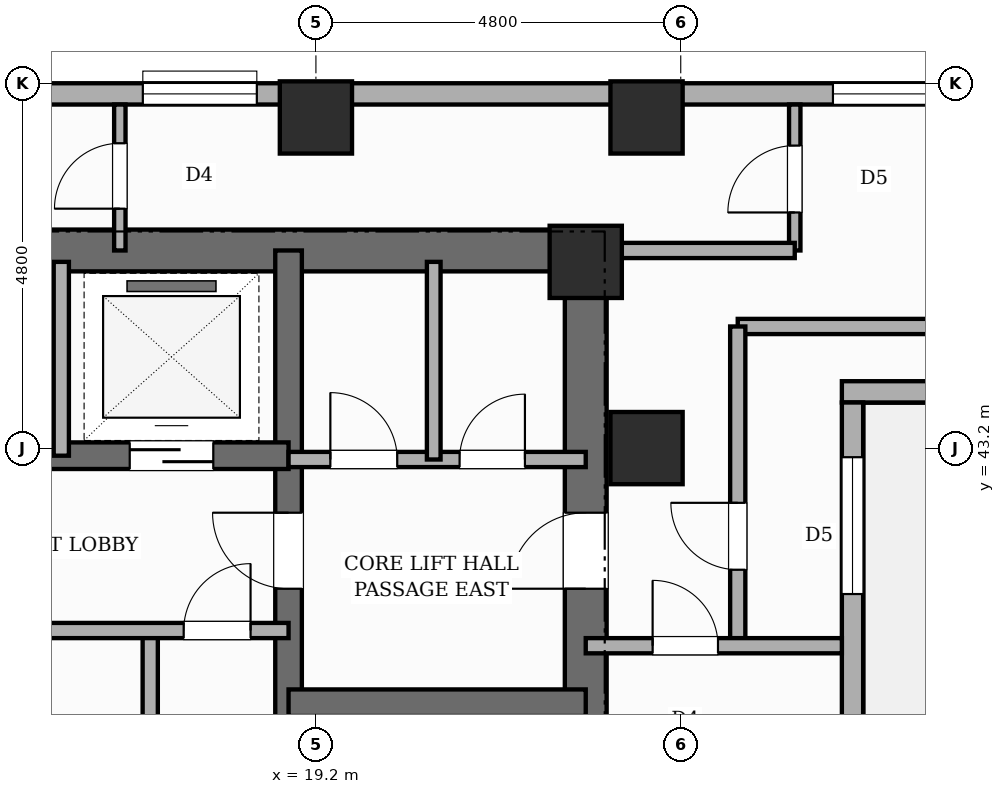
"""IFC4 building model, lengths in metres.
Left out: names, types, materials, properties, quantities, classifications, styles, units other than length and angle.
Written with IfcOpenShell. Run it as: python <this file> out.ifc"""

import sys

from ifc_helpers import new_model, si_unit, direction, frame, frame_2d, origin, origin_2d, place, context, subcontext, project, spatial, rectangle, extrude, element, fill, save


model = new_model("IFC4")
c1 = context("Model", 3, precision=1e-05, world=origin(), true_north=direction((0.0, 1.0)))
c2 = subcontext(c1, "Body", "Model", "MODEL_VIEW")
j1 = project(units=[si_unit("LENGTHUNIT", "METRE"), si_unit("PLANEANGLEUNIT", "RADIAN")], contexts=[c1])
p1 = place(None, origin())
s1 = spatial("IfcSite", under=j1, at=p1, CompositionType="ELEMENT")
p2 = place(p1, origin())
s2 = spatial("IfcBuilding", under=s1, at=p2, CompositionType="ELEMENT")
p3 = place(p2, frame((0.0, 0.0, 193.6)))
s3 = spatial("IfcBuildingStorey", under=s2, at=p3, CompositionType="ELEMENT", Elevation=193.6)
p4 = place(p3, frame((22.75, 30.625, 0.0), z_axis=(0.0, 0.0, 1.0), x_axis=(0.0, 1.0, 0.0)))
e1 = element("IfcWall", 1, at=p4, inside=s3, PredefinedType="SHEAR", context=c2, shape_type="SweptSolid", body=[
    extrude(rectangle(XDim=15.45, YDim=0.55, at=frame_2d((7.725, 0.0))), origin(), (0.0, 0.0, 1.0), 4.8),
])
p5 = place(p4, frame((10.725, 0.0, 0.0)))
e2 = element("IfcOpeningElement", 2, at=p5, cuts=e1, PredefinedType="OPENING", context=c2, shape_type="SweptSolid", body=[
    extrude(rectangle(XDim=1.0, YDim=2.15, at=frame_2d((0.5, 1.075))), frame((0.0, 0.285, 0.0), z_axis=(0.0, -1.0, 0.0), x_axis=(1.0, 0.0, 0.0)), (0.0, 0.0, 1.0), 0.57),
])
p6 = place(p3, frame((6.05, 45.8, 0.0), z_axis=(0.0, 0.0, 1.0), x_axis=(1.0, 0.0, 0.0)))
e3 = element("IfcWall", 3, at=p6, inside=s3, PredefinedType="SHEAR", context=c2, shape_type="SweptSolid", body=[
    extrude(rectangle(XDim=16.7, YDim=0.55, at=frame_2d((8.35, 0.0))), origin(), (0.0, 0.0, 1.0), 4.8),
])
p7 = place(p3, frame((18.84, 30.9, 0.0), z_axis=(0.0, 0.0, 1.0), x_axis=(0.0, 1.0, 0.0)))
e4 = element("IfcWall", 4, at=p7, inside=s3, PredefinedType="SHEAR", context=c2, shape_type="SweptSolid", body=[
    extrude(rectangle(XDim=14.9, YDim=0.35, at=frame_2d((7.45, 0.0))), origin(), (0.0, 0.0, 1.0), 4.8),
])
p8 = place(p7, frame((0.65, 0.0, 0.0)))
e5 = element("IfcOpeningElement", 5, at=p8, cuts=e4, PredefinedType="OPENING", context=c2, shape_type="SweptSolid", body=[
    extrude(rectangle(XDim=0.95, YDim=2.1, at=frame_2d((0.475, 1.05))), frame((0.0, 0.185, 0.0), z_axis=(0.0, -1.0, 0.0), x_axis=(1.0, 0.0, 0.0)), (0.0, 0.0, 1.0), 0.37),
])
p9 = place(p7, frame((10.45, 0.0, 0.0)))
e6 = element("IfcOpeningElement", 6, at=p9, cuts=e4, PredefinedType="OPENING", context=c2, shape_type="SweptSolid", body=[
    extrude(rectangle(XDim=1.0, YDim=2.15, at=frame_2d((0.5, 1.075))), frame((0.0, 0.185, 0.0), z_axis=(0.0, -1.0, 0.0), x_axis=(1.0, 0.0, 0.0)), (0.0, 0.0, 1.0), 0.37),
])
p10 = place(p3, frame((18.84, 39.85, 0.0), z_axis=(0.0, 0.0, 1.0), x_axis=(1.0, 0.0, 0.0)))
e7 = element("IfcWall", 7, at=p10, inside=s3, PredefinedType="SHEAR", context=c2, shape_type="SweptSolid", body=[
    extrude(rectangle(XDim=3.91, YDim=0.35, at=frame_2d((1.955, 0.0))), origin(), (0.0, 0.0, 1.0), 4.8),
])
p11 = place(p3, frame((9.96, 43.1, 0.0), z_axis=(0.0, 0.0, 1.0), x_axis=(1.0, 0.0, 0.0)))
e8 = element("IfcWall", 8, at=p11, inside=s3, PredefinedType="SHEAR", context=c2, shape_type="SweptSolid", body=[
    extrude(rectangle(XDim=8.88, YDim=0.35, at=frame_2d((4.44, 0.0))), origin(), (0.0, 0.0, 1.0), 4.8),
])
p12 = place(p11, frame((0.99, 0.0, 0.0)))
e9 = element("IfcOpeningElement", 9, at=p12, cuts=e8, PredefinedType="OPENING", context=c2, shape_type="SweptSolid", body=[
    extrude(rectangle(XDim=1.1, YDim=2.15, at=frame_2d((0.55, 1.075))), frame((0.0, 0.185, 0.0), z_axis=(0.0, -1.0, 0.0), x_axis=(1.0, 0.0, 0.0)), (0.0, 0.0, 1.0), 0.37),
])
p13 = place(p11, frame((3.89, 0.0, 0.0)))
e10 = element("IfcOpeningElement", 10, at=p13, cuts=e8, PredefinedType="OPENING", context=c2, shape_type="SweptSolid", body=[
    extrude(rectangle(XDim=1.1, YDim=2.15, at=frame_2d((0.55, 1.075))), frame((0.0, 0.185, 0.0), z_axis=(0.0, -1.0, 0.0), x_axis=(1.0, 0.0, 0.0)), (0.0, 0.0, 1.0), 0.37),
])
p14 = place(p11, frame((6.79, 0.0, 0.0)))
e11 = element("IfcOpeningElement", 11, at=p14, cuts=e8, PredefinedType="OPENING", context=c2, shape_type="SweptSolid", body=[
    extrude(rectangle(XDim=1.1, YDim=2.15, at=frame_2d((0.55, 1.075))), frame((0.0, 0.185, 0.0), z_axis=(0.0, -1.0, 0.0), x_axis=(1.0, 0.0, 0.0)), (0.0, 0.0, 1.0), 0.37),
])
for number, where, z_axis, x_axis in (
    (12, (19.2, 47.55, 0.0), (0.0, 0.0, 1.0), (1.0, 0.0, 0.0)),
    (13, (22.75, 45.65, 0.0), (0.0, 0.0, 1.0), (1.0, 0.0, 0.0)),
    (14, (23.55, 43.2, 0.0), (0.0, 0.0, 1.0), (1.0, 0.0, 0.0)),
    (15, (23.55, 47.55, 0.0), (0.0, 0.0, 1.0), (1.0, 0.0, 0.0)),
):
    element("IfcColumn", number, at=place(p3, frame(where, z_axis=z_axis, x_axis=x_axis)), inside=s3, PredefinedType="COLUMN", context=c2, shape_type="SweptSolid", body=[
        extrude(rectangle(XDim=0.95, YDim=0.95, at=origin_2d()), origin(), (0.0, 0.0, 1.0), 4.8),
    ])
p15 = place(p3, frame((7.2, 47.86, 0.0), z_axis=(0.0, 0.0, 1.0), x_axis=(1.0, 0.0, 0.0)))
e16 = element("IfcWall", 16, at=p15, inside=s3, PredefinedType="STANDARD", context=c2, shape_type="SweptSolid", body=[
    extrude(rectangle(XDim=43.2, YDim=0.28, at=frame_2d((21.6, 0.0))), origin(), (0.0, 0.0, 1.0), 3.78),
])
p16 = place(p15, frame((18.802, 0.0, 0.8)))
e17 = element("IfcOpeningElement", 17, at=p16, cuts=e16, PredefinedType="OPENING", context=c2, shape_type="SweptSolid", body=[
    extrude(rectangle(XDim=1.8, YDim=2.1, at=frame_2d((0.9, 1.05))), frame((0.0, 0.15, 0.0), z_axis=(0.0, -1.0, 0.0), x_axis=(1.0, 0.0, 0.0)), (0.0, 0.0, 1.0), 0.3),
])
p17 = place(p15, frame((0.383, 0.0, 0.8)))
e18 = element("IfcOpeningElement", 18, at=p17, cuts=e16, PredefinedType="OPENING", context=c2, shape_type="SweptSolid", body=[
    extrude(rectangle(XDim=1.2, YDim=1.8, at=frame_2d((0.6, 0.9))), frame((0.0, 0.15, 0.0), z_axis=(0.0, -1.0, 0.0), x_axis=(1.0, 0.0, 0.0)), (0.0, 0.0, 1.0), 0.3),
])
p18 = place(p15, frame((9.722, 0.0, 0.8)))
e19 = element("IfcOpeningElement", 19, at=p18, cuts=e16, PredefinedType="OPENING", context=c2, shape_type="SweptSolid", body=[
    extrude(rectangle(XDim=1.5, YDim=2.1, at=frame_2d((0.75, 1.05))), frame((0.0, 0.15, 0.0), z_axis=(0.0, -1.0, 0.0), x_axis=(1.0, 0.0, 0.0)), (0.0, 0.0, 1.0), 0.3),
])
p19 = place(p3, frame((30.04, 43.94, 0.0), z_axis=(0.0, 0.0, 1.0), x_axis=(-1.0, 0.0, 0.0)))
e20 = element("IfcWall", 20, at=p19, inside=s3, PredefinedType="STANDARD", context=c2, shape_type="SweptSolid", body=[
    extrude(rectangle(XDim=3.92, YDim=0.28, at=frame_2d((1.96, 0.0))), origin(), (0.0, 0.0, 1.0), 4.5),
])
p20 = place(p3, frame((26.26, 43.8, 0.0), z_axis=(0.0, 0.0, 1.0), x_axis=(0.0, -1.0, 0.0)))
e21 = element("IfcWall", 21, at=p20, inside=s3, PredefinedType="STANDARD", context=c2, shape_type="SweptSolid", body=[
    extrude(rectangle(XDim=15.0, YDim=0.28, at=frame_2d((7.5, 0.0))), origin(), (0.0, 0.0, 1.0), 4.5),
])
p21 = place(p20, frame((8.15, 0.0, 0.0)))
e22 = element("IfcOpeningElement", 22, at=p21, cuts=e21, PredefinedType="OPENING", context=c2, shape_type="SweptSolid", body=[
    extrude(rectangle(XDim=1.3, YDim=2.2, at=frame_2d((0.65, 1.1))), frame((0.0, 0.15, 0.0), z_axis=(0.0, -1.0, 0.0), x_axis=(1.0, 0.0, 0.0)), (0.0, 0.0, 1.0), 0.3),
])
p22 = place(p20, frame((0.72, 0.0, 0.8)))
e23 = element("IfcOpeningElement", 23, at=p22, cuts=e21, PredefinedType="OPENING", context=c2, shape_type="SweptSolid", body=[
    extrude(rectangle(XDim=1.8, YDim=2.1, at=frame_2d((0.9, 1.05))), frame((0.0, 0.15, 0.0), z_axis=(0.0, -1.0, 0.0), x_axis=(1.0, 0.0, 0.0)), (0.0, 0.0, 1.0), 0.3),
])
p23 = place(p20, frame((4.735, 0.0, 0.8)))
e24 = element("IfcOpeningElement", 24, at=p23, cuts=e21, PredefinedType="OPENING", context=c2, shape_type="SweptSolid", body=[
    extrude(rectangle(XDim=1.8, YDim=2.1, at=frame_2d((0.9, 1.05))), frame((0.0, 0.15, 0.0), z_axis=(0.0, -1.0, 0.0), x_axis=(1.0, 0.0, 0.0)), (0.0, 0.0, 1.0), 0.3),
])
p24 = place(p3, frame((17.02, 35.65, 0.0), z_axis=(0.0, 0.0, 1.0), x_axis=(0.0, 1.0, 0.0)))
e25 = element("IfcWall", 25, at=p24, inside=s3, PredefinedType="POLYGONAL", context=c2, shape_type="SweptSolid", body=[
    extrude(rectangle(XDim=5.15, YDim=0.2, at=frame_2d((2.575, 0.0))), origin(), (0.0, 0.0, 1.0), 4.5),
])
p25 = place(p3, frame((9.96, 40.8, 0.0), z_axis=(0.0, 0.0, 1.0), x_axis=(1.0, 0.0, 0.0)))
e26 = element("IfcWall", 26, at=p25, inside=s3, PredefinedType="POLYGONAL", context=c2, shape_type="SweptSolid", body=[
    extrude(rectangle(XDim=8.88, YDim=0.2, at=frame_2d((4.44, 0.0))), origin(), (0.0, 0.0, 1.0), 4.5),
])
p26 = place(p25, frame((7.5, 0.0, 0.0)))
e27 = element("IfcOpeningElement", 27, at=p26, cuts=e26, PredefinedType="OPENING", context=c2, shape_type="SweptSolid", body=[
    extrude(rectangle(XDim=0.88, YDim=2.1, at=frame_2d((0.44, 1.05))), frame((0.0, 0.11, 0.0), z_axis=(0.0, -1.0, 0.0), x_axis=(1.0, 0.0, 0.0)), (0.0, 0.0, 1.0), 0.22),
])
p27 = place(p25, frame((3.6, 0.0, 0.0)))
e28 = element("IfcOpeningElement", 28, at=p27, cuts=e26, PredefinedType="OPENING", context=c2, shape_type="SweptSolid", body=[
    extrude(rectangle(XDim=0.88, YDim=2.1, at=frame_2d((0.44, 1.05))), frame((0.0, 0.11, 0.0), z_axis=(0.0, -1.0, 0.0), x_axis=(1.0, 0.0, 0.0)), (0.0, 0.0, 1.0), 0.22),
])
p28 = place(p3, frame((18.84, 43.05, 0.0), z_axis=(0.0, 0.0, 1.0), x_axis=(1.0, 0.0, 0.0)))
e29 = element("IfcWall", 29, at=p28, inside=s3, PredefinedType="POLYGONAL", context=c2, shape_type="SweptSolid", body=[
    extrude(rectangle(XDim=3.91, YDim=0.2, at=frame_2d((1.955, 0.0))), origin(), (0.0, 0.0, 1.0), 3.78),
])
p29 = place(p28, frame((0.55, 0.0, 0.0)))
e30 = element("IfcOpeningElement", 30, at=p29, cuts=e29, PredefinedType="OPENING", context=c2, shape_type="SweptSolid", body=[
    extrude(rectangle(XDim=0.88, YDim=2.1, at=frame_2d((0.44, 1.05))), frame((0.0, 0.11, 0.0), z_axis=(0.0, -1.0, 0.0), x_axis=(1.0, 0.0, 0.0)), (0.0, 0.0, 1.0), 0.22),
])
p30 = place(p28, frame((2.25, 0.0, 0.0)))
e31 = element("IfcOpeningElement", 31, at=p30, cuts=e29, PredefinedType="OPENING", context=c2, shape_type="SweptSolid", body=[
    extrude(rectangle(XDim=0.86, YDim=2.1, at=frame_2d((0.43, 1.05))), frame((0.0, 0.11, 0.0), z_axis=(0.0, -1.0, 0.0), x_axis=(1.0, 0.0, 0.0)), (0.0, 0.0, 1.0), 0.22),
])
p31 = place(p3, frame((15.85, 43.1, 0.0), z_axis=(0.0, 0.0, 1.0), x_axis=(0.0, 1.0, 0.0)))
e32 = element("IfcWall", 32, at=p31, inside=s3, PredefinedType="POLYGONAL", context=c2, shape_type="SweptSolid", body=[
    extrude(rectangle(XDim=2.55, YDim=0.2, at=frame_2d((1.275, 0.0))), origin(), (0.0, 0.0, 1.0), 4.5),
])
p32 = place(p3, frame((20.75, 43.05, 0.0), z_axis=(0.0, 0.0, 1.0), x_axis=(0.0, 1.0, 0.0)))
e33 = element("IfcWall", 33, at=p32, inside=s3, PredefinedType="PLUMBINGWALL", context=c2, shape_type="SweptSolid", body=[
    extrude(rectangle(XDim=2.6, YDim=0.18, at=frame_2d((1.3, 0.0))), origin(), (0.0, 0.0, 1.0), 4.5),
])
p33 = place(p3, frame((25.5, 45.8, 0.0), z_axis=(0.0, 0.0, 1.0), x_axis=(0.0, 1.0, 0.0)))
e34 = element("IfcWall", 34, at=p33, inside=s3, PredefinedType="PARTITIONING", context=c2, shape_type="SweptSolid", body=[
    extrude(rectangle(XDim=1.92, YDim=0.15, at=frame_2d((0.96, 0.0))), origin(), (0.0, 0.0, 1.0), 4.5),
])
p34 = place(p33, frame((0.5, 0.0, 0.0)))
e35 = element("IfcOpeningElement", 35, at=p34, cuts=e34, PredefinedType="OPENING", context=c2, shape_type="SweptSolid", body=[
    extrude(rectangle(XDim=0.88, YDim=2.1, at=frame_2d((0.44, 1.05))), frame((0.0, 0.085, 0.0), z_axis=(0.0, -1.0, 0.0), x_axis=(1.0, 0.0, 0.0)), (0.0, 0.0, 1.0), 0.17),
])
p35 = place(p3, frame((16.62, 45.8, 0.0), z_axis=(0.0, 0.0, 1.0), x_axis=(0.0, 1.0, 0.0)))
e36 = element("IfcWall", 36, at=p35, inside=s3, PredefinedType="PARTITIONING", context=c2, shape_type="SweptSolid", body=[
    extrude(rectangle(XDim=1.92, YDim=0.15, at=frame_2d((0.96, 0.0))), origin(), (0.0, 0.0, 1.0), 4.5),
])
p36 = place(p35, frame((0.55, 0.0, 0.0)))
e37 = element("IfcOpeningElement", 37, at=p36, cuts=e36, PredefinedType="OPENING", context=c2, shape_type="SweptSolid", body=[
    extrude(rectangle(XDim=0.86, YDim=2.1, at=frame_2d((0.43, 1.05))), frame((0.0, 0.085, 0.0), z_axis=(0.0, -1.0, 0.0), x_axis=(1.0, 0.0, 0.0)), (0.0, 0.0, 1.0), 0.17),
])
p37 = place(p3, frame((22.75, 45.8, 0.0), z_axis=(0.0, 0.0, 1.0), x_axis=(1.0, 0.0, 0.0)))
e38 = element("IfcWall", 38, at=p37, inside=s3, PredefinedType="PARTITIONING", context=c2, shape_type="SweptSolid", body=[
    extrude(rectangle(XDim=2.75, YDim=0.2, at=frame_2d((1.375, 0.0))), origin(), (0.0, 0.0, 1.0), 4.5),
])
p38 = place(p3, frame((24.75, 44.8, 0.0), z_axis=(0.0, 0.0, 1.0), x_axis=(1.0, 0.0, 0.0)))
e39 = element("IfcWall", 39, at=p38, inside=s3, PredefinedType="PARTITIONING", context=c2, shape_type="SweptSolid", body=[
    extrude(rectangle(XDim=17.03, YDim=0.2, at=frame_2d((8.515, 0.0))), origin(), (0.0, 0.0, 1.0), 4.5),
])
p39 = place(p3, frame((24.75, 40.6, 0.0), z_axis=(0.0, 0.0, 1.0), x_axis=(0.0, 1.0, 0.0)))
e40 = element("IfcWall", 40, at=p39, inside=s3, PredefinedType="PARTITIONING", context=c2, shape_type="SweptSolid", body=[
    extrude(rectangle(XDim=4.2, YDim=0.2, at=frame_2d((2.1, 0.0))), origin(), (0.0, 0.0, 1.0), 4.5),
])
p40 = place(p39, frame((1.0, 0.0, 0.0)))
e41 = element("IfcOpeningElement", 41, at=p40, cuts=e40, PredefinedType="OPENING", context=c2, shape_type="SweptSolid", body=[
    extrude(rectangle(XDim=0.88, YDim=2.1, at=frame_2d((0.44, 1.05))), frame((0.0, 0.11, 0.0), z_axis=(0.0, -1.0, 0.0), x_axis=(1.0, 0.0, 0.0)), (0.0, 0.0, 1.0), 0.22),
])
p41 = place(p3, frame((22.75, 40.6, 0.0), z_axis=(0.0, 0.0, 1.0), x_axis=(1.0, 0.0, 0.0)))
e42 = element("IfcWall", 42, at=p41, inside=s3, PredefinedType="PARTITIONING", context=c2, shape_type="SweptSolid", body=[
    extrude(rectangle(XDim=3.37, YDim=0.2, at=frame_2d((1.685, 0.0))), origin(), (0.0, 0.0, 1.0), 4.5),
])
p42 = place(p41, frame((0.88, 0.0, 0.0)))
e43 = element("IfcOpeningElement", 43, at=p42, cuts=e42, PredefinedType="OPENING", context=c2, shape_type="SweptSolid", body=[
    extrude(rectangle(XDim=0.86, YDim=2.1, at=frame_2d((0.43, 1.05))), frame((0.0, 0.11, 0.0), z_axis=(0.0, -1.0, 0.0), x_axis=(1.0, 0.0, 0.0)), (0.0, 0.0, 1.0), 0.22),
])
p43 = place(p16, origin())
e44 = element("IfcWindow", 44, at=p43, inside=s3, PartitioningType="SINGLE_PANEL", PredefinedType="WINDOW", context=c2, shape_type="SweptSolid", body=[
    extrude(rectangle(XDim=1.8, YDim=2.1, at=frame_2d((0.9, 1.05))), frame((0.0, 0.03, 0.0), z_axis=(0.0, -1.0, 0.0), x_axis=(1.0, 0.0, 0.0)), (0.0, 0.0, 1.0), 0.06),
])
fill(e17, e44)
p44 = place(p18, origin())
e45 = element("IfcWindow", 45, at=p44, inside=s3, PartitioningType="SINGLE_PANEL", PredefinedType="WINDOW", context=c2, shape_type="SweptSolid", body=[
    extrude(rectangle(XDim=1.5, YDim=2.1, at=frame_2d((0.75, 1.05))), frame((0.0, 0.03, 0.0), z_axis=(0.0, -1.0, 0.0), x_axis=(1.0, 0.0, 0.0)), (0.0, 0.0, 1.0), 0.06),
])
fill(e19, e45)
p45 = place(p22, origin())
e46 = element("IfcWindow", 46, at=p45, inside=s3, PartitioningType="SINGLE_PANEL", PredefinedType="WINDOW", context=c2, shape_type="SweptSolid", body=[
    extrude(rectangle(XDim=1.8, YDim=2.1, at=frame_2d((0.9, 1.05))), frame((0.0, 0.03, 0.0), z_axis=(0.0, -1.0, 0.0), x_axis=(1.0, 0.0, 0.0)), (0.0, 0.0, 1.0), 0.06),
])
fill(e23, e46)
p46 = place(p26, origin())
e47 = element("IfcDoor", 47, at=p46, inside=s3, OperationType="SINGLE_SWING_RIGHT", PredefinedType="DOOR", context=c2, shape_type="SweptSolid", body=[
    extrude(rectangle(XDim=0.88, YDim=2.1, at=frame_2d((0.44, 1.05))), frame((0.0, 0.025, 0.0), z_axis=(0.0, -1.0, 0.0), x_axis=(1.0, 0.0, 0.0)), (0.0, 0.0, 1.0), 0.05),
])
fill(e27, e47)
p47 = place(p14, origin())
e48 = element("IfcDoor", 48, at=p47, inside=s3, OperationType="SLIDING_TO_LEFT", PredefinedType="DOOR", context=c2, shape_type="SweptSolid", body=[
    extrude(rectangle(XDim=1.1, YDim=2.15, at=frame_2d((0.55, 1.075))), frame((0.0, 0.025, 0.0), z_axis=(0.0, -1.0, 0.0), x_axis=(1.0, 0.0, 0.0)), (0.0, 0.0, 1.0), 0.05),
])
fill(e11, e48)
p48 = place(p9, origin())
e49 = element("IfcDoor", 49, at=p48, inside=s3, OperationType="SINGLE_SWING_RIGHT", PredefinedType="DOOR", context=c2, shape_type="SweptSolid", body=[
    extrude(rectangle(XDim=1.0, YDim=2.15, at=frame_2d((0.5, 1.075))), frame((0.0, 0.025, 0.0), z_axis=(0.0, -1.0, 0.0), x_axis=(1.0, 0.0, 0.0)), (0.0, 0.0, 1.0), 0.05),
])
fill(e6, e49)
p49 = place(p5, origin())
e50 = element("IfcDoor", 50, at=p49, inside=s3, OperationType="SINGLE_SWING_LEFT", PredefinedType="DOOR", context=c2, shape_type="SweptSolid", body=[
    extrude(rectangle(XDim=1.0, YDim=2.15, at=frame_2d((0.5, 1.075))), frame((0.0, 0.025, 0.0), z_axis=(0.0, -1.0, 0.0), x_axis=(1.0, 0.0, 0.0)), (0.0, 0.0, 1.0), 0.05),
])
fill(e2, e50)
p50 = place(p29, origin())
e51 = element("IfcDoor", 51, at=p50, inside=s3, OperationType="SINGLE_SWING_LEFT", PredefinedType="DOOR", context=c2, shape_type="SweptSolid", body=[
    extrude(rectangle(XDim=0.88, YDim=2.1, at=frame_2d((0.44, 1.05))), frame((0.0, 0.025, 0.0), z_axis=(0.0, -1.0, 0.0), x_axis=(1.0, 0.0, 0.0)), (0.0, 0.0, 1.0), 0.05),
])
fill(e30, e51)
p51 = place(p30, origin())
e52 = element("IfcDoor", 52, at=p51, inside=s3, OperationType="SINGLE_SWING_RIGHT", PredefinedType="DOOR", context=c2, shape_type="SweptSolid", body=[
    extrude(rectangle(XDim=0.86, YDim=2.1, at=frame_2d((0.43, 1.05))), frame((0.0, 0.025, 0.0), z_axis=(0.0, -1.0, 0.0), x_axis=(1.0, 0.0, 0.0)), (0.0, 0.0, 1.0), 0.05),
])
fill(e31, e52)
p52 = place(p34, origin())
e53 = element("IfcDoor", 53, at=p52, inside=s3, OperationType="SINGLE_SWING_LEFT", PredefinedType="DOOR", context=c2, shape_type="SweptSolid", body=[
    extrude(rectangle(XDim=0.88, YDim=2.1, at=frame_2d((0.44, 1.05))), frame((0.0, 0.025, 0.0), z_axis=(0.0, -1.0, 0.0), x_axis=(1.0, 0.0, 0.0)), (0.0, 0.0, 1.0), 0.05),
])
fill(e35, e53)
p53 = place(p36, origin())
e54 = element("IfcDoor", 54, at=p53, inside=s3, OperationType="SINGLE_SWING_LEFT", PredefinedType="DOOR", context=c2, shape_type="SweptSolid", body=[
    extrude(rectangle(XDim=0.86, YDim=2.1, at=frame_2d((0.43, 1.05))), frame((0.0, 0.025, 0.0), z_axis=(0.0, -1.0, 0.0), x_axis=(1.0, 0.0, 0.0)), (0.0, 0.0, 1.0), 0.05),
])
fill(e37, e54)
p54 = place(p40, origin())
e55 = element("IfcDoor", 55, at=p54, inside=s3, OperationType="SINGLE_SWING_RIGHT", PredefinedType="DOOR", context=c2, shape_type="SweptSolid", body=[
    extrude(rectangle(XDim=0.88, YDim=2.1, at=frame_2d((0.44, 1.05))), frame((0.0, 0.025, 0.0), z_axis=(0.0, -1.0, 0.0), x_axis=(1.0, 0.0, 0.0)), (0.0, 0.0, 1.0), 0.05),
])
fill(e41, e55)
p55 = place(p42, origin())
e56 = element("IfcDoor", 56, at=p55, inside=s3, OperationType="SINGLE_SWING_LEFT", PredefinedType="DOOR", context=c2, shape_type="SweptSolid", body=[
    extrude(rectangle(XDim=0.86, YDim=2.1, at=frame_2d((0.43, 1.05))), frame((0.0, 0.025, 0.0), z_axis=(0.0, -1.0, 0.0), x_axis=(1.0, 0.0, 0.0)), (0.0, 0.0, 1.0), 0.05),
])
fill(e43, e56)
save(model, sys.argv[1])
